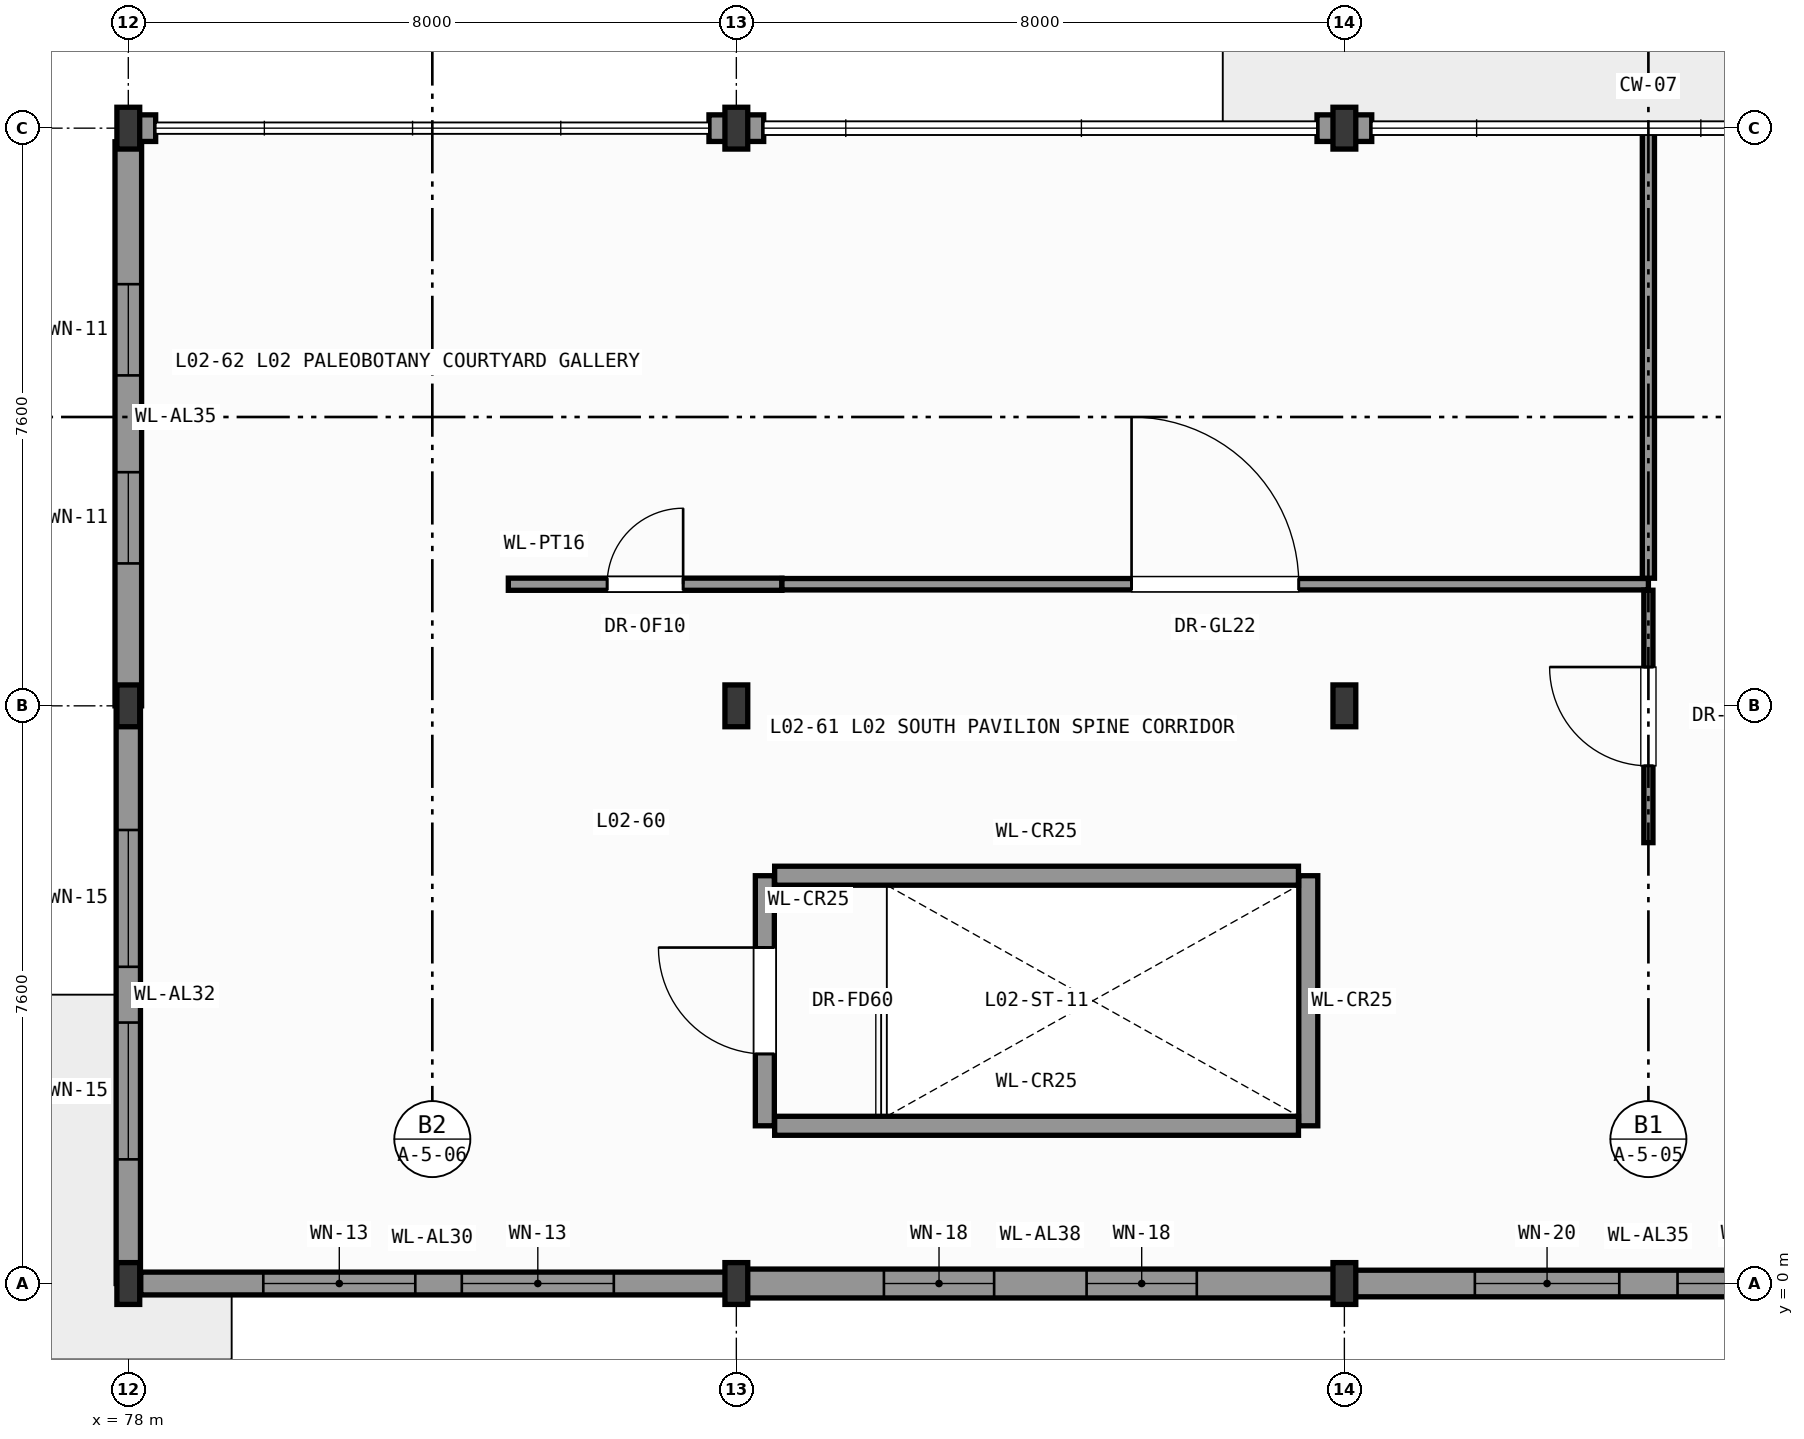
"""IFC4 building model, lengths in metres.
Left out: names, types, materials, properties, quantities, classifications, styles, units other than length and angle.
Written with IfcOpenShell. Run it as: python <this file> out.ifc"""

import sys

from ifc_helpers import new_model, si_unit, direction, frame, frame_2d, origin, origin_2d, place, context, subcontext, project, spatial, rectangle, i_section, extrude, element, fill, save


model = new_model("IFC4")
c1 = context("Model", 3, precision=1e-05, world=origin(), true_north=direction((0.0, 1.0)))
c2 = subcontext(c1, "Body", "Model", "MODEL_VIEW")
j1 = project(units=[si_unit("LENGTHUNIT", "METRE"), si_unit("PLANEANGLEUNIT", "RADIAN")], contexts=[c1])
p1 = place(None, origin())
s1 = spatial("IfcSite", under=j1, at=p1, CompositionType="ELEMENT")
p2 = place(p1, origin())
s2 = spatial("IfcBuilding", under=s1, at=p2, CompositionType="ELEMENT")
p3 = place(p2, frame((0.0, 0.0, 7.8)))
s3 = spatial("IfcBuildingStorey", under=s2, at=p3, CompositionType="ELEMENT", Elevation=7.8)
for number, where, z_axis, x_axis in (
    (1, (78.0, 0.0, 0.0), (0.0, 0.0, 1.0), (1.0, 0.0, 0.0)),
    (2, (78.0, 7.6, 0.0), (0.0, 0.0, 1.0), (1.0, 0.0, 0.0)),
    (3, (78.0, 15.2, 0.0), (0.0, 0.0, 1.0), (1.0, 0.0, 0.0)),
    (4, (86.0, 0.0, 0.0), (0.0, 0.0, 1.0), (1.0, 0.0, 0.0)),
    (5, (86.0, 7.6, 0.0), (0.0, 0.0, 1.0), (1.0, 0.0, 0.0)),
    (6, (86.0, 15.2, 0.0), (0.0, 0.0, 1.0), (1.0, 0.0, 0.0)),
    (7, (94.0, 0.0, 0.0), (0.0, 0.0, 1.0), (1.0, 0.0, 0.0)),
    (8, (94.0, 7.6, 0.0), (0.0, 0.0, 1.0), (1.0, 0.0, 0.0)),
    (9, (94.0, 15.2, 0.0), (0.0, 0.0, 1.0), (1.0, 0.0, 0.0)),
):
    element("IfcColumn", number, at=place(p3, frame(where, z_axis=z_axis, x_axis=x_axis)), inside=s3, PredefinedType="COLUMN", context=c2, shape_type="SweptSolid", body=[
        extrude(i_section(OverallWidth=0.3, OverallDepth=0.55, WebThickness=0.015, FlangeThickness=0.029, FilletRadius=0.027, at=origin_2d()), origin(), (0.0, 0.0, 1.0), 5.4),
    ])
for number, where, z_axis, x_axis in (
    (10, (94.36, 15.2, 0.0), (0.0, 0.0, 1.0), (-1.0, 0.0, 0.0)),
    (11, (94.0, 15.2, 0.0), (0.0, 0.0, 1.0), (-1.0, 0.0, 0.0)),
    (12, (86.36, 15.2, 0.0), (0.0, 0.0, 1.0), (-1.0, 0.0, 0.0)),
):
    element("IfcWall", number, at=place(p3, frame(where, z_axis=z_axis, x_axis=x_axis)), inside=s3, PredefinedType="SOLIDWALL", context=c2, shape_type="SweptSolid", body=[
        extrude(rectangle(XDim=0.36, YDim=0.35, at=frame_2d((0.18, 0.0))), origin(), (0.0, 0.0, 1.0), 4.735),
    ])
for number, where, z_axis, x_axis in (
    (13, (86.0, 15.2, 0.0), (0.0, 0.0, 1.0), (-1.0, 0.0, 0.0)),
    (14, (78.36, 15.2, 0.0), (0.0, 0.0, 1.0), (-1.0, 0.0, 0.0)),
):
    element("IfcWall", number, at=place(p3, frame(where, z_axis=z_axis, x_axis=x_axis)), inside=s3, PredefinedType="SOLIDWALL", context=c2, shape_type="SweptSolid", body=[
        extrude(rectangle(XDim=0.36, YDim=0.35, at=frame_2d((0.18, 0.0))), origin(), (0.0, 0.0, 1.0), 4.825),
    ])
p4 = place(p3, frame((78.0, 7.6, 0.0), z_axis=(0.0, 0.0, 1.0), x_axis=(0.0, 1.0, 0.0)))
e15 = element("IfcWall", 15, at=p4, inside=s3, PredefinedType="SOLIDWALL", context=c2, shape_type="SweptSolid", body=[
    extrude(rectangle(XDim=7.421, YDim=0.35, at=frame_2d((3.71, 0.0))), origin(), (0.0, 0.0, 1.0), 4.685),
])
p5 = place(p4, frame((1.874, 0.0, 0.95)))
e16 = element("IfcOpeningElement", 16, at=p5, cuts=e15, PredefinedType="OPENING", context=c2, shape_type="SweptSolid", body=[
    extrude(rectangle(XDim=1.2, YDim=2.4, at=frame_2d((0.6, 1.2))), frame((0.0, 0.185, 0.0), z_axis=(0.0, -1.0, 0.0), x_axis=(1.0, 0.0, 0.0)), (0.0, 0.0, 1.0), 0.37),
])
p6 = place(p4, frame((4.347, 0.0, 0.95)))
e17 = element("IfcOpeningElement", 17, at=p6, cuts=e15, PredefinedType="OPENING", context=c2, shape_type="SweptSolid", body=[
    extrude(rectangle(XDim=1.2, YDim=2.4, at=frame_2d((0.6, 1.2))), frame((0.0, 0.185, 0.0), z_axis=(0.0, -1.0, 0.0), x_axis=(1.0, 0.0, 0.0)), (0.0, 0.0, 1.0), 0.37),
])
p7 = place(p3, frame((78.0, 0.0, 0.0), z_axis=(0.0, 0.0, 1.0), x_axis=(0.0, 1.0, 0.0)))
e18 = element("IfcWall", 18, at=p7, inside=s3, PredefinedType="SOLIDWALL", context=c2, shape_type="SweptSolid", body=[
    extrude(rectangle(XDim=7.6, YDim=0.32, at=frame_2d((3.8, 0.0))), origin(), (0.0, 0.0, 1.0), 4.685),
])
p8 = place(p7, frame((1.633, 0.0, 0.95)))
e19 = element("IfcOpeningElement", 19, at=p8, cuts=e18, PredefinedType="OPENING", context=c2, shape_type="SweptSolid", body=[
    extrude(rectangle(XDim=1.8, YDim=2.4, at=frame_2d((0.9, 1.2))), frame((0.0, 0.17, 0.0), z_axis=(0.0, -1.0, 0.0), x_axis=(1.0, 0.0, 0.0)), (0.0, 0.0, 1.0), 0.34),
])
p9 = place(p7, frame((4.167, 0.0, 0.95)))
e20 = element("IfcOpeningElement", 20, at=p9, cuts=e18, PredefinedType="OPENING", context=c2, shape_type="SweptSolid", body=[
    extrude(rectangle(XDim=1.8, YDim=2.4, at=frame_2d((0.9, 1.2))), frame((0.0, 0.17, 0.0), z_axis=(0.0, -1.0, 0.0), x_axis=(1.0, 0.0, 0.0)), (0.0, 0.0, 1.0), 0.34),
])
p10 = place(p3, frame((86.0, 0.0, 0.0), z_axis=(0.0, 0.0, 1.0), x_axis=(-1.0, 0.0, 0.0)))
e21 = element("IfcWall", 21, at=p10, inside=s3, PredefinedType="SOLIDWALL", context=c2, shape_type="SweptSolid", body=[
    extrude(rectangle(XDim=7.836, YDim=0.3, at=frame_2d((3.918, 0.0))), origin(), (0.0, 0.0, 1.0), 4.795),
])
p11 = place(p10, frame((1.612, 0.0, 0.95)))
e22 = element("IfcOpeningElement", 22, at=p11, cuts=e21, PredefinedType="OPENING", context=c2, shape_type="SweptSolid", body=[
    extrude(rectangle(XDim=2.0, YDim=2.2, at=frame_2d((1.0, 1.1))), frame((0.0, 0.16, 0.0), z_axis=(0.0, -1.0, 0.0), x_axis=(1.0, 0.0, 0.0)), (0.0, 0.0, 1.0), 0.32),
])
p12 = place(p10, frame((4.224, 0.0, 0.95)))
e23 = element("IfcOpeningElement", 23, at=p12, cuts=e21, PredefinedType="OPENING", context=c2, shape_type="SweptSolid", body=[
    extrude(rectangle(XDim=2.0, YDim=2.2, at=frame_2d((1.0, 1.1))), frame((0.0, 0.16, 0.0), z_axis=(0.0, -1.0, 0.0), x_axis=(1.0, 0.0, 0.0)), (0.0, 0.0, 1.0), 0.32),
])
p13 = place(p3, frame((94.0, 0.0, 0.0), z_axis=(0.0, 0.0, 1.0), x_axis=(-1.0, 0.0, 0.0)))
e24 = element("IfcWall", 24, at=p13, inside=s3, PredefinedType="SOLIDWALL", context=c2, shape_type="SweptSolid", body=[
    extrude(rectangle(XDim=8.0, YDim=0.38, at=frame_2d((4.0, 0.0))), origin(), (0.0, 0.0, 1.0), 4.795),
])
p14 = place(p13, frame((1.942, 0.0, 0.95)))
e25 = element("IfcOpeningElement", 25, at=p14, cuts=e24, PredefinedType="OPENING", context=c2, shape_type="SweptSolid", body=[
    extrude(rectangle(XDim=1.45, YDim=2.5, at=frame_2d((0.725, 1.25))), frame((0.0, 0.2, 0.0), z_axis=(0.0, -1.0, 0.0), x_axis=(1.0, 0.0, 0.0)), (0.0, 0.0, 1.0), 0.4),
])
p15 = place(p13, frame((4.608, 0.0, 0.95)))
e26 = element("IfcOpeningElement", 26, at=p15, cuts=e24, PredefinedType="OPENING", context=c2, shape_type="SweptSolid", body=[
    extrude(rectangle(XDim=1.45, YDim=2.5, at=frame_2d((0.725, 1.25))), frame((0.0, 0.2, 0.0), z_axis=(0.0, -1.0, 0.0), x_axis=(1.0, 0.0, 0.0)), (0.0, 0.0, 1.0), 0.4),
])
p16 = place(p3, frame((102.0, 0.0, 0.0), z_axis=(0.0, 0.0, 1.0), x_axis=(-1.0, 0.0, 0.0)))
e27 = element("IfcWall", 27, at=p16, inside=s3, PredefinedType="SOLIDWALL", context=c2, shape_type="SweptSolid", body=[
    extrude(rectangle(XDim=8.0, YDim=0.35, at=frame_2d((4.0, 0.0))), origin(), (0.0, 0.0, 1.0), 4.795),
])
p17 = place(p16, frame((1.717, 0.0, 0.95)))
e28 = element("IfcOpeningElement", 28, at=p17, cuts=e27, PredefinedType="OPENING", context=c2, shape_type="SweptSolid", body=[
    extrude(rectangle(XDim=1.9, YDim=2.9, at=frame_2d((0.95, 1.45))), frame((0.0, 0.185, 0.0), z_axis=(0.0, -1.0, 0.0), x_axis=(1.0, 0.0, 0.0)), (0.0, 0.0, 1.0), 0.37),
])
p18 = place(p16, frame((4.383, 0.0, 0.95)))
e29 = element("IfcOpeningElement", 29, at=p18, cuts=e27, PredefinedType="OPENING", context=c2, shape_type="SweptSolid", body=[
    extrude(rectangle(XDim=1.9, YDim=2.9, at=frame_2d((0.95, 1.45))), frame((0.0, 0.185, 0.0), z_axis=(0.0, -1.0, 0.0), x_axis=(1.0, 0.0, 0.0)), (0.0, 0.0, 1.0), 0.37),
])
p19 = place(p3, frame((86.375, 2.075, 0.0), z_axis=(0.0, 0.0, 1.0), x_axis=(0.0, 1.0, 0.0)))
e30 = element("IfcWall", 30, at=p19, inside=s3, PredefinedType="SHEAR", context=c2, shape_type="SweptSolid", body=[
    extrude(rectangle(XDim=3.29, YDim=0.25, at=frame_2d((1.645, 0.0))), origin(), (0.0, 0.0, 1.0), 5.15),
])
p20 = place(p19, frame((0.945, 0.0, 0.0)))
e31 = element("IfcOpeningElement", 31, at=p20, cuts=e30, PredefinedType="OPENING", context=c2, shape_type="SweptSolid", body=[
    extrude(rectangle(XDim=1.4, YDim=2.2, at=frame_2d((0.7, 1.1))), frame((0.0, 0.135, 0.0), z_axis=(0.0, -1.0, 0.0), x_axis=(1.0, 0.0, 0.0)), (0.0, 0.0, 1.0), 0.27),
])
p21 = place(p3, frame((93.525, 2.075, 0.0), z_axis=(0.0, 0.0, 1.0), x_axis=(0.0, 1.0, 0.0)))
e32 = element("IfcWall", 32, at=p21, inside=s3, PredefinedType="SHEAR", context=c2, shape_type="SweptSolid", body=[
    extrude(rectangle(XDim=3.29, YDim=0.25, at=frame_2d((1.645, 0.0))), origin(), (0.0, 0.0, 1.0), 5.15),
])
for number, where, z_axis, x_axis in (
    (33, (86.504, 2.075, 0.0), (0.0, 0.0, 1.0), (1.0, 0.0, 0.0)),
    (34, (86.504, 5.365, 0.0), (0.0, 0.0, 1.0), (1.0, 0.0, 0.0)),
):
    element("IfcWall", number, at=place(p3, frame(where, z_axis=z_axis, x_axis=x_axis)), inside=s3, PredefinedType="SHEAR", context=c2, shape_type="SweptSolid", body=[
        extrude(rectangle(XDim=6.892, YDim=0.25, at=frame_2d((3.446, 0.0))), origin(), (0.0, 0.0, 1.0), 5.15),
    ])
p22 = place(p3, frame((83.0, 9.2, 0.0), z_axis=(0.0, 0.0, 1.0), x_axis=(1.0, 0.0, 0.0)))
e35 = element("IfcWall", 35, at=p22, inside=s3, PredefinedType="PARTITIONING", context=c2, shape_type="SweptSolid", body=[
    extrude(rectangle(XDim=3.6, YDim=0.16, at=frame_2d((1.8, 0.0))), origin(), (0.0, 0.0, 1.0), 5.15),
])
p23 = place(p22, frame((1.3, 0.0, 0.0)))
e36 = element("IfcOpeningElement", 36, at=p23, cuts=e35, PredefinedType="OPENING", context=c2, shape_type="SweptSolid", body=[
    extrude(rectangle(XDim=1.0, YDim=2.15, at=frame_2d((0.5, 1.075))), frame((0.0, 0.09, 0.0), z_axis=(0.0, -1.0, 0.0), x_axis=(1.0, 0.0, 0.0)), (0.0, 0.0, 1.0), 0.18),
])
p24 = place(p3, frame((86.6, 9.2, 0.0), z_axis=(0.0, 0.0, 1.0), x_axis=(1.0, 0.0, 0.0)))
e37 = element("IfcWall", 37, at=p24, inside=s3, PredefinedType="PARTITIONING", context=c2, shape_type="SweptSolid", body=[
    extrude(rectangle(XDim=11.4, YDim=0.15, at=frame_2d((5.7, 0.0))), origin(), (0.0, 0.0, 1.0), 5.15),
])
p25 = place(p24, frame((4.6, 0.0, 0.0)))
e38 = element("IfcOpeningElement", 38, at=p25, cuts=e37, PredefinedType="OPENING", context=c2, shape_type="SweptSolid", body=[
    extrude(rectangle(XDim=2.2, YDim=2.6, at=frame_2d((1.1, 1.3))), frame((0.0, 0.085, 0.0), z_axis=(0.0, -1.0, 0.0), x_axis=(1.0, 0.0, 0.0)), (0.0, 0.0, 1.0), 0.17),
])
p26 = place(p3, frame((98.0, 5.8, 0.0), z_axis=(0.0, 0.0, 1.0), x_axis=(0.0, 1.0, 0.0)))
e39 = element("IfcWall", 39, at=p26, inside=s3, PredefinedType="PARTITIONING", context=c2, shape_type="SweptSolid", body=[
    extrude(rectangle(XDim=3.321, YDim=0.12, at=frame_2d((1.661, 0.0))), origin(), (0.0, 0.0, 1.0), 5.15),
])
p27 = place(p26, frame((1.01, 0.0, 0.0)))
e40 = element("IfcOpeningElement", 40, at=p27, cuts=e39, PredefinedType="OPENING", context=c2, shape_type="SweptSolid", body=[
    extrude(rectangle(XDim=1.3, YDim=2.25, at=frame_2d((0.65, 1.125))), frame((0.0, 0.07, 0.0), z_axis=(0.0, -1.0, 0.0), x_axis=(1.0, 0.0, 0.0)), (0.0, 0.0, 1.0), 0.14),
])
p28 = place(p3, frame((98.0, 9.279, 0.0), z_axis=(0.0, 0.0, 1.0), x_axis=(0.0, 1.0, 0.0)))
e41 = element("IfcWall", 41, at=p28, inside=s3, PredefinedType="PARTITIONING", context=c2, shape_type="SweptSolid", body=[
    extrude(rectangle(XDim=5.921, YDim=0.16, at=frame_2d((2.96, 0.0))), origin(), (0.0, 0.0, 1.0), 5.15),
])
p29 = place(p5, origin())
e42 = element("IfcWindow", 42, at=p29, inside=s3, PartitioningType="SINGLE_PANEL", PredefinedType="WINDOW", context=c2, shape_type="SweptSolid", body=[
    extrude(rectangle(XDim=1.2, YDim=2.4, at=frame_2d((0.6, 1.2))), frame((0.0, 0.03, 0.0), z_axis=(0.0, -1.0, 0.0), x_axis=(1.0, 0.0, 0.0)), (0.0, 0.0, 1.0), 0.06),
])
fill(e16, e42)
p30 = place(p6, origin())
e43 = element("IfcWindow", 43, at=p30, inside=s3, PartitioningType="SINGLE_PANEL", PredefinedType="WINDOW", context=c2, shape_type="SweptSolid", body=[
    extrude(rectangle(XDim=1.2, YDim=2.4, at=frame_2d((0.6, 1.2))), frame((0.0, 0.03, 0.0), z_axis=(0.0, -1.0, 0.0), x_axis=(1.0, 0.0, 0.0)), (0.0, 0.0, 1.0), 0.06),
])
fill(e17, e43)
p31 = place(p8, origin())
e44 = element("IfcWindow", 44, at=p31, inside=s3, PartitioningType="SINGLE_PANEL", PredefinedType="WINDOW", context=c2, shape_type="SweptSolid", body=[
    extrude(rectangle(XDim=1.8, YDim=2.4, at=frame_2d((0.9, 1.2))), frame((0.0, 0.03, 0.0), z_axis=(0.0, -1.0, 0.0), x_axis=(1.0, 0.0, 0.0)), (0.0, 0.0, 1.0), 0.06),
])
fill(e19, e44)
p32 = place(p9, origin())
e45 = element("IfcWindow", 45, at=p32, inside=s3, PartitioningType="SINGLE_PANEL", PredefinedType="WINDOW", context=c2, shape_type="SweptSolid", body=[
    extrude(rectangle(XDim=1.8, YDim=2.4, at=frame_2d((0.9, 1.2))), frame((0.0, 0.03, 0.0), z_axis=(0.0, -1.0, 0.0), x_axis=(1.0, 0.0, 0.0)), (0.0, 0.0, 1.0), 0.06),
])
fill(e20, e45)
p33 = place(p11, origin())
e46 = element("IfcWindow", 46, at=p33, inside=s3, PartitioningType="SINGLE_PANEL", PredefinedType="WINDOW", context=c2, shape_type="SweptSolid", body=[
    extrude(rectangle(XDim=2.0, YDim=2.2, at=frame_2d((1.0, 1.1))), frame((0.0, 0.03, 0.0), z_axis=(0.0, -1.0, 0.0), x_axis=(1.0, 0.0, 0.0)), (0.0, 0.0, 1.0), 0.06),
])
fill(e22, e46)
p34 = place(p12, origin())
e47 = element("IfcWindow", 47, at=p34, inside=s3, PartitioningType="SINGLE_PANEL", PredefinedType="WINDOW", context=c2, shape_type="SweptSolid", body=[
    extrude(rectangle(XDim=2.0, YDim=2.2, at=frame_2d((1.0, 1.1))), frame((0.0, 0.03, 0.0), z_axis=(0.0, -1.0, 0.0), x_axis=(1.0, 0.0, 0.0)), (0.0, 0.0, 1.0), 0.06),
])
fill(e23, e47)
p35 = place(p14, origin())
e48 = element("IfcWindow", 48, at=p35, inside=s3, PartitioningType="SINGLE_PANEL", PredefinedType="WINDOW", context=c2, shape_type="SweptSolid", body=[
    extrude(rectangle(XDim=1.45, YDim=2.5, at=frame_2d((0.725, 1.25))), frame((0.0, 0.03, 0.0), z_axis=(0.0, -1.0, 0.0), x_axis=(1.0, 0.0, 0.0)), (0.0, 0.0, 1.0), 0.06),
])
fill(e25, e48)
p36 = place(p15, origin())
e49 = element("IfcWindow", 49, at=p36, inside=s3, PartitioningType="SINGLE_PANEL", PredefinedType="WINDOW", context=c2, shape_type="SweptSolid", body=[
    extrude(rectangle(XDim=1.45, YDim=2.5, at=frame_2d((0.725, 1.25))), frame((0.0, 0.03, 0.0), z_axis=(0.0, -1.0, 0.0), x_axis=(1.0, 0.0, 0.0)), (0.0, 0.0, 1.0), 0.06),
])
fill(e26, e49)
p37 = place(p17, origin())
e50 = element("IfcWindow", 50, at=p37, inside=s3, PartitioningType="SINGLE_PANEL", PredefinedType="WINDOW", context=c2, shape_type="SweptSolid", body=[
    extrude(rectangle(XDim=1.9, YDim=2.9, at=frame_2d((0.95, 1.45))), frame((0.0, 0.03, 0.0), z_axis=(0.0, -1.0, 0.0), x_axis=(1.0, 0.0, 0.0)), (0.0, 0.0, 1.0), 0.06),
])
fill(e28, e50)
p38 = place(p18, origin())
e51 = element("IfcWindow", 51, at=p38, inside=s3, PartitioningType="SINGLE_PANEL", PredefinedType="WINDOW", context=c2, shape_type="SweptSolid", body=[
    extrude(rectangle(XDim=1.9, YDim=2.9, at=frame_2d((0.95, 1.45))), frame((0.0, 0.03, 0.0), z_axis=(0.0, -1.0, 0.0), x_axis=(1.0, 0.0, 0.0)), (0.0, 0.0, 1.0), 0.06),
])
fill(e29, e51)
p39 = place(p20, origin())
e52 = element("IfcDoor", 52, at=p39, inside=s3, OperationType="SINGLE_SWING_RIGHT", PredefinedType="DOOR", context=c2, shape_type="SweptSolid", body=[
    extrude(rectangle(XDim=1.4, YDim=2.2, at=frame_2d((0.7, 1.1))), frame((0.0, 0.025, 0.0), z_axis=(0.0, -1.0, 0.0), x_axis=(1.0, 0.0, 0.0)), (0.0, 0.0, 1.0), 0.05),
])
fill(e31, e52)
p40 = place(p23, origin())
e53 = element("IfcDoor", 53, at=p40, inside=s3, OperationType="SINGLE_SWING_RIGHT", PredefinedType="DOOR", context=c2, shape_type="SweptSolid", body=[
    extrude(rectangle(XDim=1.0, YDim=2.15, at=frame_2d((0.5, 1.075))), frame((0.0, 0.025, 0.0), z_axis=(0.0, -1.0, 0.0), x_axis=(1.0, 0.0, 0.0)), (0.0, 0.0, 1.0), 0.05),
])
fill(e36, e53)
p41 = place(p25, origin())
e54 = element("IfcDoor", 54, at=p41, inside=s3, OperationType="SINGLE_SWING_LEFT", PredefinedType="DOOR", context=c2, shape_type="SweptSolid", body=[
    extrude(rectangle(XDim=2.2, YDim=2.6, at=frame_2d((1.1, 1.3))), frame((0.0, 0.025, 0.0), z_axis=(0.0, -1.0, 0.0), x_axis=(1.0, 0.0, 0.0)), (0.0, 0.0, 1.0), 0.05),
])
fill(e38, e54)
p42 = place(p27, origin())
e55 = element("IfcDoor", 55, at=p42, inside=s3, OperationType="SINGLE_SWING_RIGHT", PredefinedType="DOOR", context=c2, shape_type="SweptSolid", body=[
    extrude(rectangle(XDim=1.3, YDim=2.25, at=frame_2d((0.65, 1.125))), frame((0.0, 0.025, 0.0), z_axis=(0.0, -1.0, 0.0), x_axis=(1.0, 0.0, 0.0)), (0.0, 0.0, 1.0), 0.05),
])
fill(e40, e55)
save(model, sys.argv[1])
